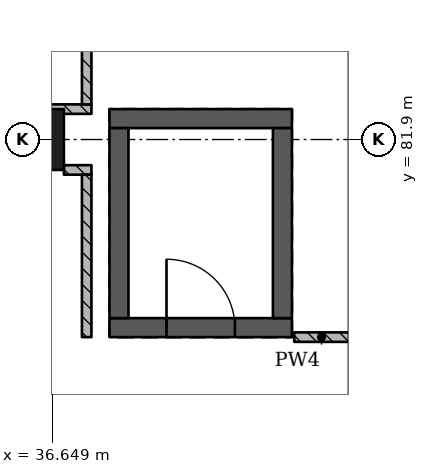
"""IFC4 building model, lengths in metres.
Left out: names, types, materials, properties, quantities, classifications, styles, units other than length and angle.
Written with IfcOpenShell. Run it as: python <this file> out.ifc"""

import sys

from ifc_helpers import new_model, si_unit, direction, frame, frame_2d, origin, origin_2d, place, context, subcontext, project, spatial, rectangle, extrude, element, fill, save


model = new_model("IFC4")
c1 = context("Model", 3, precision=1e-05, world=origin(), true_north=direction((0.0, 1.0)))
c2 = subcontext(c1, "Body", "Model", "MODEL_VIEW")
j1 = project(units=[si_unit("LENGTHUNIT", "METRE"), si_unit("PLANEANGLEUNIT", "RADIAN")], contexts=[c1])
p1 = place(None, origin())
s1 = spatial("IfcSite", under=j1, at=p1, CompositionType="ELEMENT")
p2 = place(p1, origin())
s2 = spatial("IfcBuilding", under=s1, at=p2, CompositionType="ELEMENT")
p3 = place(p2, frame((0.0, 0.0, 6.37)))
s3 = spatial("IfcBuildingStorey", under=s2, at=p3, CompositionType="ELEMENT", Elevation=6.37)
p4 = place(p3, frame((36.4, 81.9, 0.0), z_axis=(0.0, 0.0, 1.0), x_axis=(1.0, 0.0, 0.0)))
e1 = element("IfcColumn", 1, at=p4, inside=s3, PredefinedType="COLUMN", context=c2, shape_type="SweptSolid", body=[
    extrude(rectangle(XDim=0.8, YDim=0.8, at=origin_2d()), origin(), (0.0, 0.0, 1.0), 4.55),
])
p5 = place(p3, frame((39.8, 79.425, 0.0), z_axis=(0.0, 0.0, 1.0), x_axis=(-1.0, 0.0, 0.0)))
e2 = element("IfcWall", 2, at=p5, inside=s3, PredefinedType="SHEAR", context=c2, shape_type="SweptSolid", body=[
    extrude(rectangle(XDim=2.4, YDim=0.25, at=frame_2d((1.2, 0.0))), origin(), (0.0, 0.0, 1.0), 4.55),
])
p6 = place(p5, frame((0.75, 0.0, 0.0)))
e3 = element("IfcOpeningElement", 3, at=p6, cuts=e2, PredefinedType="OPENING", context=c2, shape_type="SweptSolid", body=[
    extrude(rectangle(XDim=0.9, YDim=2.1, at=frame_2d((0.45, 1.05))), frame((0.0, 0.135, 0.0), z_axis=(0.0, -1.0, 0.0), x_axis=(1.0, 0.0, 0.0)), (0.0, 0.0, 1.0), 0.27),
])
p7 = place(p3, frame((39.8, 82.175, 0.0), z_axis=(0.0, 0.0, 1.0), x_axis=(-1.0, 0.0, 0.0)))
e4 = element("IfcWall", 4, at=p7, inside=s3, PredefinedType="SHEAR", context=c2, shape_type="SweptSolid", body=[
    extrude(rectangle(XDim=2.4, YDim=0.25, at=frame_2d((1.2, 0.0))), origin(), (0.0, 0.0, 1.0), 4.55),
])
for number, where, z_axis, x_axis in (
    (5, (37.525, 82.05, 0.0), (0.0, 0.0, 1.0), (0.0, -1.0, 0.0)),
    (6, (39.675, 82.05, 0.0), (0.0, 0.0, 1.0), (0.0, -1.0, 0.0)),
):
    element("IfcWall", number, at=place(p3, frame(where, z_axis=z_axis, x_axis=x_axis)), inside=s3, PredefinedType="SHEAR", context=c2, shape_type="SweptSolid", body=[
        extrude(rectangle(XDim=2.5, YDim=0.25, at=frame_2d((1.25, 0.0))), origin(), (0.0, 0.0, 1.0), 4.55),
    ])
p8 = place(p3, frame((36.4, 82.3, 0.0), z_axis=(0.0, 0.0, 1.0), x_axis=(1.0, 0.0, 0.0)))
e7 = element("IfcWall", 7, at=p8, inside=s3, PredefinedType="PARTITIONING", context=c2, shape_type="SweptSolid", body=[
    extrude(rectangle(XDim=0.763, YDim=0.125, at=frame_2d((0.381, 0.0))), origin(), (0.0, 0.0, 1.0), 4.25),
])
p9 = place(p3, frame((36.8, 81.5, 0.0), z_axis=(0.0, 0.0, 1.0), x_axis=(1.0, 0.0, 0.0)))
e8 = element("IfcWall", 8, at=p9, inside=s3, PredefinedType="PARTITIONING", context=c2, shape_type="SweptSolid", body=[
    extrude(rectangle(XDim=0.363, YDim=0.125, at=frame_2d((0.181, 0.0))), origin(), (0.0, 0.0, 1.0), 4.25),
])
p10 = place(p3, frame((37.1, 81.438, 0.0), z_axis=(0.0, 0.0, 1.0), x_axis=(0.0, -1.0, 0.0)))
e9 = element("IfcWall", 9, at=p10, inside=s3, PredefinedType="PARTITIONING", context=c2, shape_type="SweptSolid", body=[
    extrude(rectangle(XDim=2.137, YDim=0.125, at=frame_2d((1.069, 0.0))), origin(), (0.0, 0.0, 1.0), 4.25),
])
p11 = place(p3, frame((37.1, 89.337, 0.0), z_axis=(0.0, 0.0, 1.0), x_axis=(0.0, -1.0, 0.0)))
e10 = element("IfcWall", 10, at=p11, inside=s3, PredefinedType="PARTITIONING", context=c2, shape_type="SweptSolid", body=[
    extrude(rectangle(XDim=6.975, YDim=0.125, at=frame_2d((3.487, 0.0))), origin(), (0.0, 0.0, 1.0), 4.25),
])
p12 = place(p3, frame((40.55, 79.3, 0.0), z_axis=(0.0, 0.0, 1.0), x_axis=(-1.0, 0.0, 0.0)))
e11 = element("IfcWall", 11, at=p12, inside=s3, PredefinedType="PARTITIONING", context=c2, shape_type="SweptSolid", body=[
    extrude(rectangle(XDim=0.72, YDim=0.125, at=frame_2d((0.36, 0.0))), origin(), (0.0, 0.0, 1.0), 4.25),
])
p13 = place(p6, origin())
e12 = element("IfcDoor", 12, at=p13, inside=s3, OperationType="SINGLE_SWING_RIGHT", PredefinedType="DOOR", context=c2, shape_type="SweptSolid", body=[
    extrude(rectangle(XDim=0.9, YDim=2.1, at=frame_2d((0.45, 1.05))), frame((0.0, 0.025, 0.0), z_axis=(0.0, -1.0, 0.0), x_axis=(1.0, 0.0, 0.0)), (0.0, 0.0, 1.0), 0.05),
])
fill(e3, e12)
save(model, sys.argv[1])
